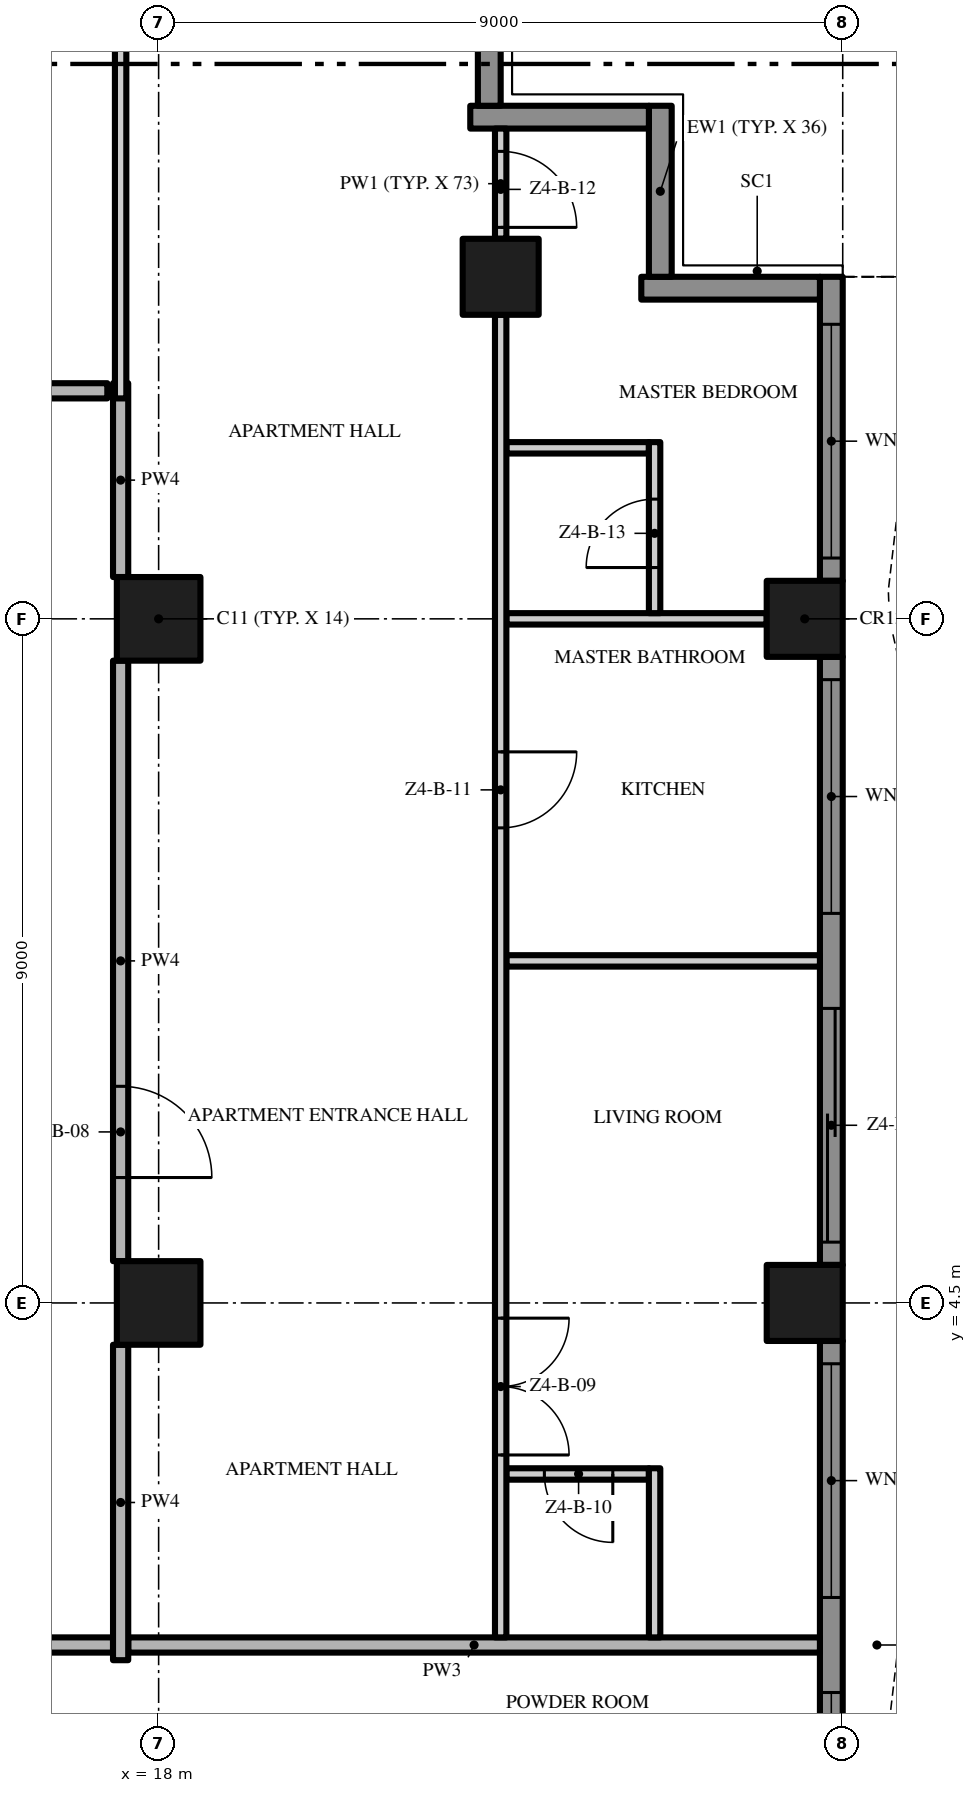
"""IFC4 building model, lengths in metres.
Left out: names, types, materials, properties, quantities, classifications, styles, units other than length and angle.
Written with IfcOpenShell. Run it as: python <this file> out.ifc"""

import sys

from ifc_helpers import new_model, si_unit, direction, frame, frame_2d, origin, origin_2d, place, context, subcontext, project, spatial, polyline, rectangle, outline, extrude, element, fill, save


model = new_model("IFC4")
c1 = context("Model", 3, precision=1e-05, world=origin(), true_north=direction((0.0, 1.0)))
c2 = subcontext(c1, "Body", "Model", "MODEL_VIEW")
j1 = project(units=[si_unit("LENGTHUNIT", "METRE"), si_unit("PLANEANGLEUNIT", "RADIAN")], contexts=[c1])
p1 = place(None, origin())
s1 = spatial("IfcSite", under=j1, at=p1, CompositionType="ELEMENT")
p2 = place(p1, origin())
s2 = spatial("IfcBuilding", under=s1, at=p2, CompositionType="ELEMENT")
p3 = place(p2, frame((0.0, 0.0, 199.6)))
s3 = spatial("IfcBuildingStorey", under=s2, at=p3, CompositionType="ELEMENT", Elevation=199.6)
for number, where, z_axis, x_axis in (
    (1, (18.0, 13.5, 0.0), (0.0, 0.0, 1.0), (1.0, 0.0, 0.0)),
    (2, (18.0, 4.5, 0.0), (0.0, 0.0, 1.0), (1.0, 0.0, 0.0)),
):
    element("IfcColumn", number, at=place(p3, frame(where, z_axis=z_axis, x_axis=x_axis)), inside=s3, PredefinedType="COLUMN", context=c2, shape_type="SweptSolid", body=[
        extrude(rectangle(XDim=1.1, YDim=1.1, at=origin_2d()), origin(), (0.0, 0.0, 1.0), 3.5),
    ])
for number, where, z_axis, x_axis in (
    (3, (26.5, 13.5, 0.0), (0.0, 0.0, 1.0), (1.0, 0.0, 0.0)),
    (4, (22.5, 18.0, 0.0), (0.0, 0.0, 1.0), (1.0, 0.0, 0.0)),
    (5, (26.5, 4.5, 0.0), (0.0, 0.0, 1.0), (1.0, 0.0, 0.0)),
):
    element("IfcColumn", number, at=place(p3, frame(where, z_axis=z_axis, x_axis=x_axis)), inside=s3, PredefinedType="COLUMN", context=c2, shape_type="SweptSolid", body=[
        extrude(rectangle(XDim=1.0, YDim=1.0, at=origin_2d()), origin(), (0.0, 0.0, 1.0), 3.5),
    ])
p4 = place(p3, frame((26.85, 4.0, 0.0), z_axis=(0.0, 0.0, 1.0), x_axis=(0.0, -1.0, 0.0)))
e6 = element("IfcWall", 6, at=p4, inside=s3, PredefinedType="SOLIDWALL", context=c2, shape_type="SweptSolid", body=[
    extrude(rectangle(XDim=8.0, YDim=0.3, at=frame_2d((4.0, 0.0))), origin(), (0.0, 0.0, 1.0), 3.5),
])
p5 = place(p4, frame((4.625, 0.0, 0.45)))
e7 = element("IfcOpeningElement", 7, at=p5, cuts=e6, PredefinedType="OPENING", context=c2, shape_type="SweptSolid", body=[
    extrude(rectangle(XDim=3.075, YDim=2.65, at=frame_2d((1.538, 1.325))), frame((0.0, 0.16, 0.0), z_axis=(0.0, -1.0, 0.0), x_axis=(1.0, 0.0, 0.0)), (0.0, 0.0, 1.0), 0.32),
])
p6 = place(p4, frame((0.3, 0.0, 0.45)))
e8 = element("IfcOpeningElement", 8, at=p6, cuts=e6, PredefinedType="OPENING", context=c2, shape_type="SweptSolid", body=[
    extrude(rectangle(XDim=3.075, YDim=2.65, at=frame_2d((1.538, 1.325))), frame((0.0, 0.16, 0.0), z_axis=(0.0, -1.0, 0.0), x_axis=(1.0, 0.0, 0.0)), (0.0, 0.0, 1.0), 0.32),
])
p7 = place(p3, frame((26.85, 13.0, 0.0), z_axis=(0.0, 0.0, 1.0), x_axis=(0.0, -1.0, 0.0)))
e9 = element("IfcWall", 9, at=p7, inside=s3, PredefinedType="SOLIDWALL", context=c2, shape_type="SweptSolid", body=[
    extrude(rectangle(XDim=8.0, YDim=0.3, at=frame_2d((4.0, 0.0))), origin(), (0.0, 0.0, 1.0), 3.5),
])
p8 = place(p7, frame((4.625, 0.0, 0.0)))
e10 = element("IfcOpeningElement", 10, at=p8, cuts=e9, PredefinedType="OPENING", context=c2, shape_type="SweptSolid", body=[
    extrude(rectangle(XDim=3.075, YDim=2.4, at=frame_2d((1.538, 1.2))), frame((0.0, 0.16, 0.0), z_axis=(0.0, -1.0, 0.0), x_axis=(1.0, 0.0, 0.0)), (0.0, 0.0, 1.0), 0.32),
])
p9 = place(p7, frame((0.3, 0.0, 0.45)))
e11 = element("IfcOpeningElement", 11, at=p9, cuts=e9, PredefinedType="OPENING", context=c2, shape_type="SweptSolid", body=[
    extrude(rectangle(XDim=3.075, YDim=2.65, at=frame_2d((1.538, 1.325))), frame((0.0, 0.16, 0.0), z_axis=(0.0, -1.0, 0.0), x_axis=(1.0, 0.0, 0.0)), (0.0, 0.0, 1.0), 0.32),
])
p10 = place(p3, frame((26.85, 18.0, 0.0), z_axis=(0.0, 0.0, 1.0), x_axis=(0.0, -1.0, 0.0)))
e12 = element("IfcWall", 12, at=p10, inside=s3, PredefinedType="SOLIDWALL", context=c2, shape_type="SweptSolid", body=[
    extrude(rectangle(XDim=4.0, YDim=0.3, at=frame_2d((2.0, 0.0))), origin(), (0.0, 0.0, 1.0), 3.5),
])
p11 = place(p10, frame((0.625, 0.0, 0.45)))
e13 = element("IfcOpeningElement", 13, at=p11, cuts=e12, PredefinedType="OPENING", context=c2, shape_type="SweptSolid", body=[
    extrude(rectangle(XDim=3.075, YDim=2.65, at=frame_2d((1.538, 1.325))), frame((0.0, 0.16, 0.0), z_axis=(0.0, -1.0, 0.0), x_axis=(1.0, 0.0, 0.0)), (0.0, 0.0, 1.0), 0.32),
])
p12 = place(p3, frame((24.35, 17.85, 0.0), z_axis=(0.0, 0.0, 1.0), x_axis=(1.0, 0.0, 0.0)))
e14 = element("IfcWall", 14, at=p12, inside=s3, PredefinedType="SOLIDWALL", context=c2, shape_type="SweptSolid", body=[
    extrude(rectangle(XDim=2.35, YDim=0.3, at=frame_2d((1.175, 0.0))), origin(), (0.0, 0.0, 1.0), 3.5),
])
p13 = place(p3, frame((24.6, 20.25, 0.0), z_axis=(0.0, 0.0, 1.0), x_axis=(0.0, -1.0, 0.0)))
e15 = element("IfcWall", 15, at=p13, inside=s3, PredefinedType="SOLIDWALL", context=c2, shape_type="SweptSolid", body=[
    extrude(rectangle(XDim=2.25, YDim=0.3, at=frame_2d((1.125, 0.0))), origin(), (0.0, 0.0, 1.0), 3.5),
])
p14 = place(p3, frame((22.1, 20.1, 0.0), z_axis=(0.0, 0.0, 1.0), x_axis=(1.0, 0.0, 0.0)))
e16 = element("IfcWall", 16, at=p14, inside=s3, PredefinedType="SOLIDWALL", context=c2, shape_type="SweptSolid", body=[
    extrude(rectangle(XDim=2.35, YDim=0.3, at=frame_2d((1.175, 0.0))), origin(), (0.0, 0.0, 1.0), 3.5),
])
p15 = place(p3, frame((22.35, 22.5, 0.0), z_axis=(0.0, 0.0, 1.0), x_axis=(0.0, -1.0, 0.0)))
e17 = element("IfcWall", 17, at=p15, inside=s3, PredefinedType="SOLIDWALL", context=c2, shape_type="SweptSolid", body=[
    extrude(rectangle(XDim=2.25, YDim=0.3, at=frame_2d((1.125, 0.0))), origin(), (0.0, 0.0, 1.0), 3.5),
])
p16 = place(p3, origin())
e18 = element("IfcWall", 18, at=p16, inside=s3, PredefinedType="USERDEFINED", context=c2, shape_type="SweptSolid", body=[
    extrude(outline(polyline([(27.951, -18.0), (27.615, -16.5), (27.6, -16.125), (27.731, -15.0), (28.255, -13.5), (28.988, -12.0), (29.649, -10.5), (29.985, -9.0), (30.0, -8.625), (29.869, -7.5), (29.345, -6.0), (28.612, -4.5), (27.951, -3.0), (27.615, -1.5), (27.6, -1.125), (27.731, 0.0), (28.255, 1.5), (28.988, 3.0), (29.649, 4.5), (29.985, 6.0), (30.0, 6.375), (29.869, 7.5), (29.345, 9.0), (28.612, 10.5), (27.951, 12.0), (27.615, 13.5), (27.6, 13.875), (27.731, 15.0), (28.255, 16.5), (28.988, 18.0), (28.763, 18.11), (28.024, 16.596), (27.486, 15.056), (27.349, 13.885), (27.366, 13.467), (27.713, 11.921), (28.385, 10.395), (29.114, 8.904), (29.624, 7.444), (29.749, 6.365), (29.736, 6.033), (29.41, 4.579), (28.761, 3.105), (28.024, 1.596), (27.486, 0.056), (27.349, -1.115), (27.366, -1.533), (27.713, -3.079), (28.385, -4.605), (29.114, -6.096), (29.624, -7.556), (29.749, -8.635), (29.736, -8.967), (29.41, -10.421), (28.761, -11.895), (28.024, -13.404), (27.486, -14.944), (27.349, -16.115), (27.366, -16.533), (27.708, -18.055), (27.951, -18.0)])), origin(), (0.0, 0.0, 1.0), 0.9),
])
p17 = place(p3, frame((17.4, 0.0, 0.0), z_axis=(0.0, 0.0, 1.0), x_axis=(-1.0, 0.0, 0.0)))
e19 = element("IfcWall", 19, at=p17, inside=s3, PredefinedType="PARTITIONING", context=c2, shape_type="SweptSolid", body=[
    extrude(rectangle(XDim=17.3, YDim=0.2, at=frame_2d((8.65, 0.0))), origin(), (0.0, 0.0, 1.0), 3.5),
])
p18 = place(p17, frame((7.65, 0.0, 0.0)))
e20 = element("IfcOpeningElement", 20, at=p18, cuts=e19, PredefinedType="OPENING", context=c2, shape_type="SweptSolid", body=[
    extrude(rectangle(XDim=1.5, YDim=2.4, at=frame_2d((0.75, 1.2))), frame((0.0, 0.11, 0.0), z_axis=(0.0, -1.0, 0.0), x_axis=(1.0, 0.0, 0.0)), (0.0, 0.0, 1.0), 0.22),
])
p19 = place(p3, frame((17.6, 0.0, 0.0), z_axis=(0.0, 0.0, 1.0), x_axis=(1.0, 0.0, 0.0)))
e21 = element("IfcWall", 21, at=p19, inside=s3, PredefinedType="PARTITIONING", context=c2, shape_type="SweptSolid", body=[
    extrude(rectangle(XDim=9.1, YDim=0.2, at=frame_2d((4.55, 0.0))), origin(), (0.0, 0.0, 1.0), 3.5),
])
p20 = place(p3, frame((24.45, 2.25, 0.0), z_axis=(0.0, 0.0, 1.0), x_axis=(-1.0, 0.0, 0.0)))
e22 = element("IfcWall", 22, at=p20, inside=s3, PredefinedType="PARTITIONING", context=c2, shape_type="SweptSolid", body=[
    extrude(rectangle(XDim=1.875, YDim=0.15, at=frame_2d((0.938, 0.0))), origin(), (0.0, 0.0, 1.0), 3.5),
])
p21 = place(p20, frame((0.475, 0.0, 0.0)))
e23 = element("IfcOpeningElement", 23, at=p21, cuts=e22, PredefinedType="OPENING", context=c2, shape_type="SweptSolid", body=[
    extrude(rectangle(XDim=0.9, YDim=2.1, at=frame_2d((0.45, 1.05))), frame((0.0, 0.085, 0.0), z_axis=(0.0, -1.0, 0.0), x_axis=(1.0, 0.0, 0.0)), (0.0, 0.0, 1.0), 0.17),
])
p22 = place(p3, frame((22.575, 9.0, 0.0), z_axis=(0.0, 0.0, 1.0), x_axis=(1.0, 0.0, 0.0)))
e24 = element("IfcWall", 24, at=p22, inside=s3, PredefinedType="PARTITIONING", context=c2, shape_type="SweptSolid", body=[
    extrude(rectangle(XDim=4.125, YDim=0.15, at=frame_2d((2.062, 0.0))), origin(), (0.0, 0.0, 1.0), 3.5),
])
p23 = place(p3, frame((22.575, 13.5, 0.0), z_axis=(0.0, 0.0, 1.0), x_axis=(1.0, 0.0, 0.0)))
e25 = element("IfcWall", 25, at=p23, inside=s3, PredefinedType="PARTITIONING", context=c2, shape_type="SweptSolid", body=[
    extrude(rectangle(XDim=3.425, YDim=0.15, at=frame_2d((1.712, 0.0))), origin(), (0.0, 0.0, 1.0), 3.5),
])
p24 = place(p3, frame((22.575, 15.75, 0.0), z_axis=(0.0, 0.0, 1.0), x_axis=(1.0, 0.0, 0.0)))
e26 = element("IfcWall", 26, at=p24, inside=s3, PredefinedType="PARTITIONING", context=c2, shape_type="SweptSolid", body=[
    extrude(rectangle(XDim=1.875, YDim=0.15, at=frame_2d((0.938, 0.0))), origin(), (0.0, 0.0, 1.0), 3.5),
])
p25 = place(p3, frame((13.5, 16.5, 0.0), z_axis=(0.0, 0.0, 1.0), x_axis=(1.0, 0.0, 0.0)))
e27 = element("IfcWall", 27, at=p25, inside=s3, PredefinedType="PARTITIONING", context=c2, shape_type="SweptSolid", body=[
    extrude(rectangle(XDim=3.825, YDim=0.2, at=frame_2d((1.913, 0.0))), origin(), (0.0, 0.0, 1.0), 3.5),
])
p26 = place(p25, frame((1.55, 0.0, 0.0)))
e28 = element("IfcOpeningElement", 28, at=p26, cuts=e27, PredefinedType="OPENING", context=c2, shape_type="SweptSolid", body=[
    extrude(rectangle(XDim=0.9, YDim=2.1, at=frame_2d((0.45, 1.05))), frame((0.0, 0.11, 0.0), z_axis=(0.0, -1.0, 0.0), x_axis=(1.0, 0.0, 0.0)), (0.0, 0.0, 1.0), 0.22),
])
p27 = place(p3, frame((17.5, -0.2, 0.0), z_axis=(0.0, 0.0, 1.0), x_axis=(0.0, 1.0, 0.0)))
e29 = element("IfcWall", 29, at=p27, inside=s3, PredefinedType="PARTITIONING", context=c2, shape_type="SweptSolid", body=[
    extrude(rectangle(XDim=4.15, YDim=0.2, at=frame_2d((2.075, 0.0))), origin(), (0.0, 0.0, 1.0), 3.5),
])
p28 = place(p3, frame((17.5, 12.95, 0.0), z_axis=(0.0, 0.0, 1.0), x_axis=(0.0, -1.0, 0.0)))
e30 = element("IfcWall", 30, at=p28, inside=s3, PredefinedType="PARTITIONING", context=c2, shape_type="SweptSolid", body=[
    extrude(rectangle(XDim=7.9, YDim=0.2, at=frame_2d((3.95, 0.0))), origin(), (0.0, 0.0, 1.0), 3.5),
])
p29 = place(p28, frame((5.6, 0.0, 0.0)))
e31 = element("IfcOpeningElement", 31, at=p29, cuts=e30, PredefinedType="OPENING", context=c2, shape_type="SweptSolid", body=[
    extrude(rectangle(XDim=1.2, YDim=2.4, at=frame_2d((0.6, 1.2))), frame((0.0, 0.11, 0.0), z_axis=(0.0, -1.0, 0.0), x_axis=(1.0, 0.0, 0.0)), (0.0, 0.0, 1.0), 0.22),
])
p30 = place(p3, frame((17.5, 14.05, 0.0), z_axis=(0.0, 0.0, 1.0), x_axis=(0.0, 1.0, 0.0)))
e32 = element("IfcWall", 32, at=p30, inside=s3, PredefinedType="PARTITIONING", context=c2, shape_type="SweptSolid", body=[
    extrude(rectangle(XDim=2.55, YDim=0.2, at=frame_2d((1.275, 0.0))), origin(), (0.0, 0.0, 1.0), 3.5),
])
p31 = place(p3, frame((17.5, 16.4, 0.0), z_axis=(0.0, 0.0, 1.0), x_axis=(0.0, 1.0, 0.0)))
e33 = element("IfcWall", 33, at=p31, inside=s3, PredefinedType="PARTITIONING", context=c2, shape_type="SweptSolid", body=[
    extrude(rectangle(XDim=5.1, YDim=0.15, at=frame_2d((2.55, 0.0))), origin(), (0.0, 0.0, 1.0), 3.5),
])
p32 = place(p3, frame((22.5, 17.5, 0.0), z_axis=(0.0, 0.0, 1.0), x_axis=(0.0, -1.0, 0.0)))
e34 = element("IfcWall", 34, at=p32, inside=s3, PredefinedType="PARTITIONING", context=c2, shape_type="SweptSolid", body=[
    extrude(rectangle(XDim=17.4, YDim=0.15, at=frame_2d((8.7, 0.0))), origin(), (0.0, 0.0, 1.0), 3.5),
])
p33 = place(p32, frame((13.2, 0.0, 0.0)))
e35 = element("IfcOpeningElement", 35, at=p33, cuts=e34, PredefinedType="OPENING", context=c2, shape_type="SweptSolid", body=[
    extrude(rectangle(XDim=1.8, YDim=2.4, at=frame_2d((0.9, 1.2))), frame((0.0, 0.085, 0.0), z_axis=(0.0, -1.0, 0.0), x_axis=(1.0, 0.0, 0.0)), (0.0, 0.0, 1.0), 0.17),
])
p34 = place(p32, frame((5.75, 0.0, 0.0)))
e36 = element("IfcOpeningElement", 36, at=p34, cuts=e34, PredefinedType="OPENING", context=c2, shape_type="SweptSolid", body=[
    extrude(rectangle(XDim=1.0, YDim=2.4, at=frame_2d((0.5, 1.2))), frame((0.0, 0.085, 0.0), z_axis=(0.0, -1.0, 0.0), x_axis=(1.0, 0.0, 0.0)), (0.0, 0.0, 1.0), 0.17),
])
p35 = place(p3, frame((22.5, 19.95, 0.0), z_axis=(0.0, 0.0, 1.0), x_axis=(0.0, -1.0, 0.0)))
e37 = element("IfcWall", 37, at=p35, inside=s3, PredefinedType="PARTITIONING", context=c2, shape_type="SweptSolid", body=[
    extrude(rectangle(XDim=1.45, YDim=0.15, at=frame_2d((0.725, 0.0))), origin(), (0.0, 0.0, 1.0), 3.5),
])
p36 = place(p35, frame((0.3, 0.0, 0.0)))
e38 = element("IfcOpeningElement", 38, at=p36, cuts=e37, PredefinedType="OPENING", context=c2, shape_type="SweptSolid", body=[
    extrude(rectangle(XDim=1.0, YDim=2.4, at=frame_2d((0.5, 1.2))), frame((0.0, 0.085, 0.0), z_axis=(0.0, -1.0, 0.0), x_axis=(1.0, 0.0, 0.0)), (0.0, 0.0, 1.0), 0.17),
])
p37 = place(p3, frame((24.525, 0.1, 0.0), z_axis=(0.0, 0.0, 1.0), x_axis=(0.0, 1.0, 0.0)))
e39 = element("IfcWall", 39, at=p37, inside=s3, PredefinedType="PARTITIONING", context=c2, shape_type="SweptSolid", body=[
    extrude(rectangle(XDim=2.225, YDim=0.15, at=frame_2d((1.113, 0.0))), origin(), (0.0, 0.0, 1.0), 3.5),
])
p38 = place(p3, frame((24.525, 13.575, 0.0), z_axis=(0.0, 0.0, 1.0), x_axis=(0.0, 1.0, 0.0)))
e40 = element("IfcWall", 40, at=p38, inside=s3, PredefinedType="PARTITIONING", context=c2, shape_type="SweptSolid", body=[
    extrude(rectangle(XDim=2.25, YDim=0.15, at=frame_2d((1.125, 0.0))), origin(), (0.0, 0.0, 1.0), 3.5),
])
p39 = place(p38, frame((0.6, 0.0, 0.0)))
e41 = element("IfcOpeningElement", 41, at=p39, cuts=e40, PredefinedType="OPENING", context=c2, shape_type="SweptSolid", body=[
    extrude(rectangle(XDim=0.9, YDim=2.1, at=frame_2d((0.45, 1.05))), frame((0.0, 0.085, 0.0), z_axis=(0.0, -1.0, 0.0), x_axis=(1.0, 0.0, 0.0)), (0.0, 0.0, 1.0), 0.17),
])
p40 = place(p5, origin())
e42 = element("IfcWindow", 42, at=p40, inside=s3, PartitioningType="SINGLE_PANEL", PredefinedType="WINDOW", context=c2, shape_type="SweptSolid", body=[
    extrude(rectangle(XDim=3.075, YDim=2.65, at=frame_2d((1.538, 1.325))), frame((0.0, 0.03, 0.0), z_axis=(0.0, -1.0, 0.0), x_axis=(1.0, 0.0, 0.0)), (0.0, 0.0, 1.0), 0.06),
])
fill(e7, e42)
p41 = place(p6, origin())
e43 = element("IfcWindow", 43, at=p41, inside=s3, PartitioningType="SINGLE_PANEL", PredefinedType="WINDOW", context=c2, shape_type="SweptSolid", body=[
    extrude(rectangle(XDim=3.075, YDim=2.65, at=frame_2d((1.538, 1.325))), frame((0.0, 0.03, 0.0), z_axis=(0.0, -1.0, 0.0), x_axis=(1.0, 0.0, 0.0)), (0.0, 0.0, 1.0), 0.06),
])
fill(e8, e43)
p42 = place(p8, origin())
e44 = element("IfcDoor", 44, at=p42, inside=s3, OperationType="SINGLE_SWING_LEFT", PredefinedType="DOOR", context=c2, shape_type="SweptSolid", body=[
    extrude(rectangle(XDim=3.075, YDim=2.4, at=frame_2d((1.538, 1.2))), frame((0.0, 0.025, 0.0), z_axis=(0.0, -1.0, 0.0), x_axis=(1.0, 0.0, 0.0)), (0.0, 0.0, 1.0), 0.05),
])
fill(e10, e44)
p43 = place(p9, origin())
e45 = element("IfcWindow", 45, at=p43, inside=s3, PartitioningType="SINGLE_PANEL", PredefinedType="WINDOW", context=c2, shape_type="SweptSolid", body=[
    extrude(rectangle(XDim=3.075, YDim=2.65, at=frame_2d((1.538, 1.325))), frame((0.0, 0.03, 0.0), z_axis=(0.0, -1.0, 0.0), x_axis=(1.0, 0.0, 0.0)), (0.0, 0.0, 1.0), 0.06),
])
fill(e11, e45)
p44 = place(p11, origin())
e46 = element("IfcWindow", 46, at=p44, inside=s3, PartitioningType="SINGLE_PANEL", PredefinedType="WINDOW", context=c2, shape_type="SweptSolid", body=[
    extrude(rectangle(XDim=3.075, YDim=2.65, at=frame_2d((1.538, 1.325))), frame((0.0, 0.03, 0.0), z_axis=(0.0, -1.0, 0.0), x_axis=(1.0, 0.0, 0.0)), (0.0, 0.0, 1.0), 0.06),
])
fill(e13, e46)
p45 = place(p29, origin())
e47 = element("IfcDoor", 47, at=p45, inside=s3, OperationType="SINGLE_SWING_RIGHT", PredefinedType="DOOR", context=c2, shape_type="SweptSolid", body=[
    extrude(rectangle(XDim=1.2, YDim=2.4, at=frame_2d((0.6, 1.2))), frame((0.0, 0.025, 0.0), z_axis=(0.0, -1.0, 0.0), x_axis=(1.0, 0.0, 0.0)), (0.0, 0.0, 1.0), 0.05),
])
fill(e31, e47)
p46 = place(p33, origin())
e48 = element("IfcDoor", 48, at=p46, inside=s3, OperationType="DOUBLE_DOOR_SINGLE_SWING", PredefinedType="DOOR", context=c2, shape_type="SweptSolid", body=[
    extrude(rectangle(XDim=1.8, YDim=2.4, at=frame_2d((0.9, 1.2))), frame((0.0, 0.025, 0.0), z_axis=(0.0, -1.0, 0.0), x_axis=(1.0, 0.0, 0.0)), (0.0, 0.0, 1.0), 0.05),
])
fill(e35, e48)
p47 = place(p21, origin())
e49 = element("IfcDoor", 49, at=p47, inside=s3, OperationType="SINGLE_SWING_LEFT", PredefinedType="DOOR", context=c2, shape_type="SweptSolid", body=[
    extrude(rectangle(XDim=0.9, YDim=2.1, at=frame_2d((0.45, 1.05))), frame((0.0, 0.025, 0.0), z_axis=(0.0, -1.0, 0.0), x_axis=(1.0, 0.0, 0.0)), (0.0, 0.0, 1.0), 0.05),
])
fill(e23, e49)
p48 = place(p34, origin())
e50 = element("IfcDoor", 50, at=p48, inside=s3, OperationType="SINGLE_SWING_LEFT", PredefinedType="DOOR", context=c2, shape_type="SweptSolid", body=[
    extrude(rectangle(XDim=1.0, YDim=2.4, at=frame_2d((0.5, 1.2))), frame((0.0, 0.025, 0.0), z_axis=(0.0, -1.0, 0.0), x_axis=(1.0, 0.0, 0.0)), (0.0, 0.0, 1.0), 0.05),
])
fill(e36, e50)
p49 = place(p36, origin())
e51 = element("IfcDoor", 51, at=p49, inside=s3, OperationType="SINGLE_SWING_RIGHT", PredefinedType="DOOR", context=c2, shape_type="SweptSolid", body=[
    extrude(rectangle(XDim=1.0, YDim=2.4, at=frame_2d((0.5, 1.2))), frame((0.0, 0.025, 0.0), z_axis=(0.0, -1.0, 0.0), x_axis=(1.0, 0.0, 0.0)), (0.0, 0.0, 1.0), 0.05),
])
fill(e38, e51)
p50 = place(p39, origin())
e52 = element("IfcDoor", 52, at=p50, inside=s3, OperationType="SINGLE_SWING_LEFT", PredefinedType="DOOR", context=c2, shape_type="SweptSolid", body=[
    extrude(rectangle(XDim=0.9, YDim=2.1, at=frame_2d((0.45, 1.05))), frame((0.0, 0.025, 0.0), z_axis=(0.0, -1.0, 0.0), x_axis=(1.0, 0.0, 0.0)), (0.0, 0.0, 1.0), 0.05),
])
fill(e41, e52)
save(model, sys.argv[1])
